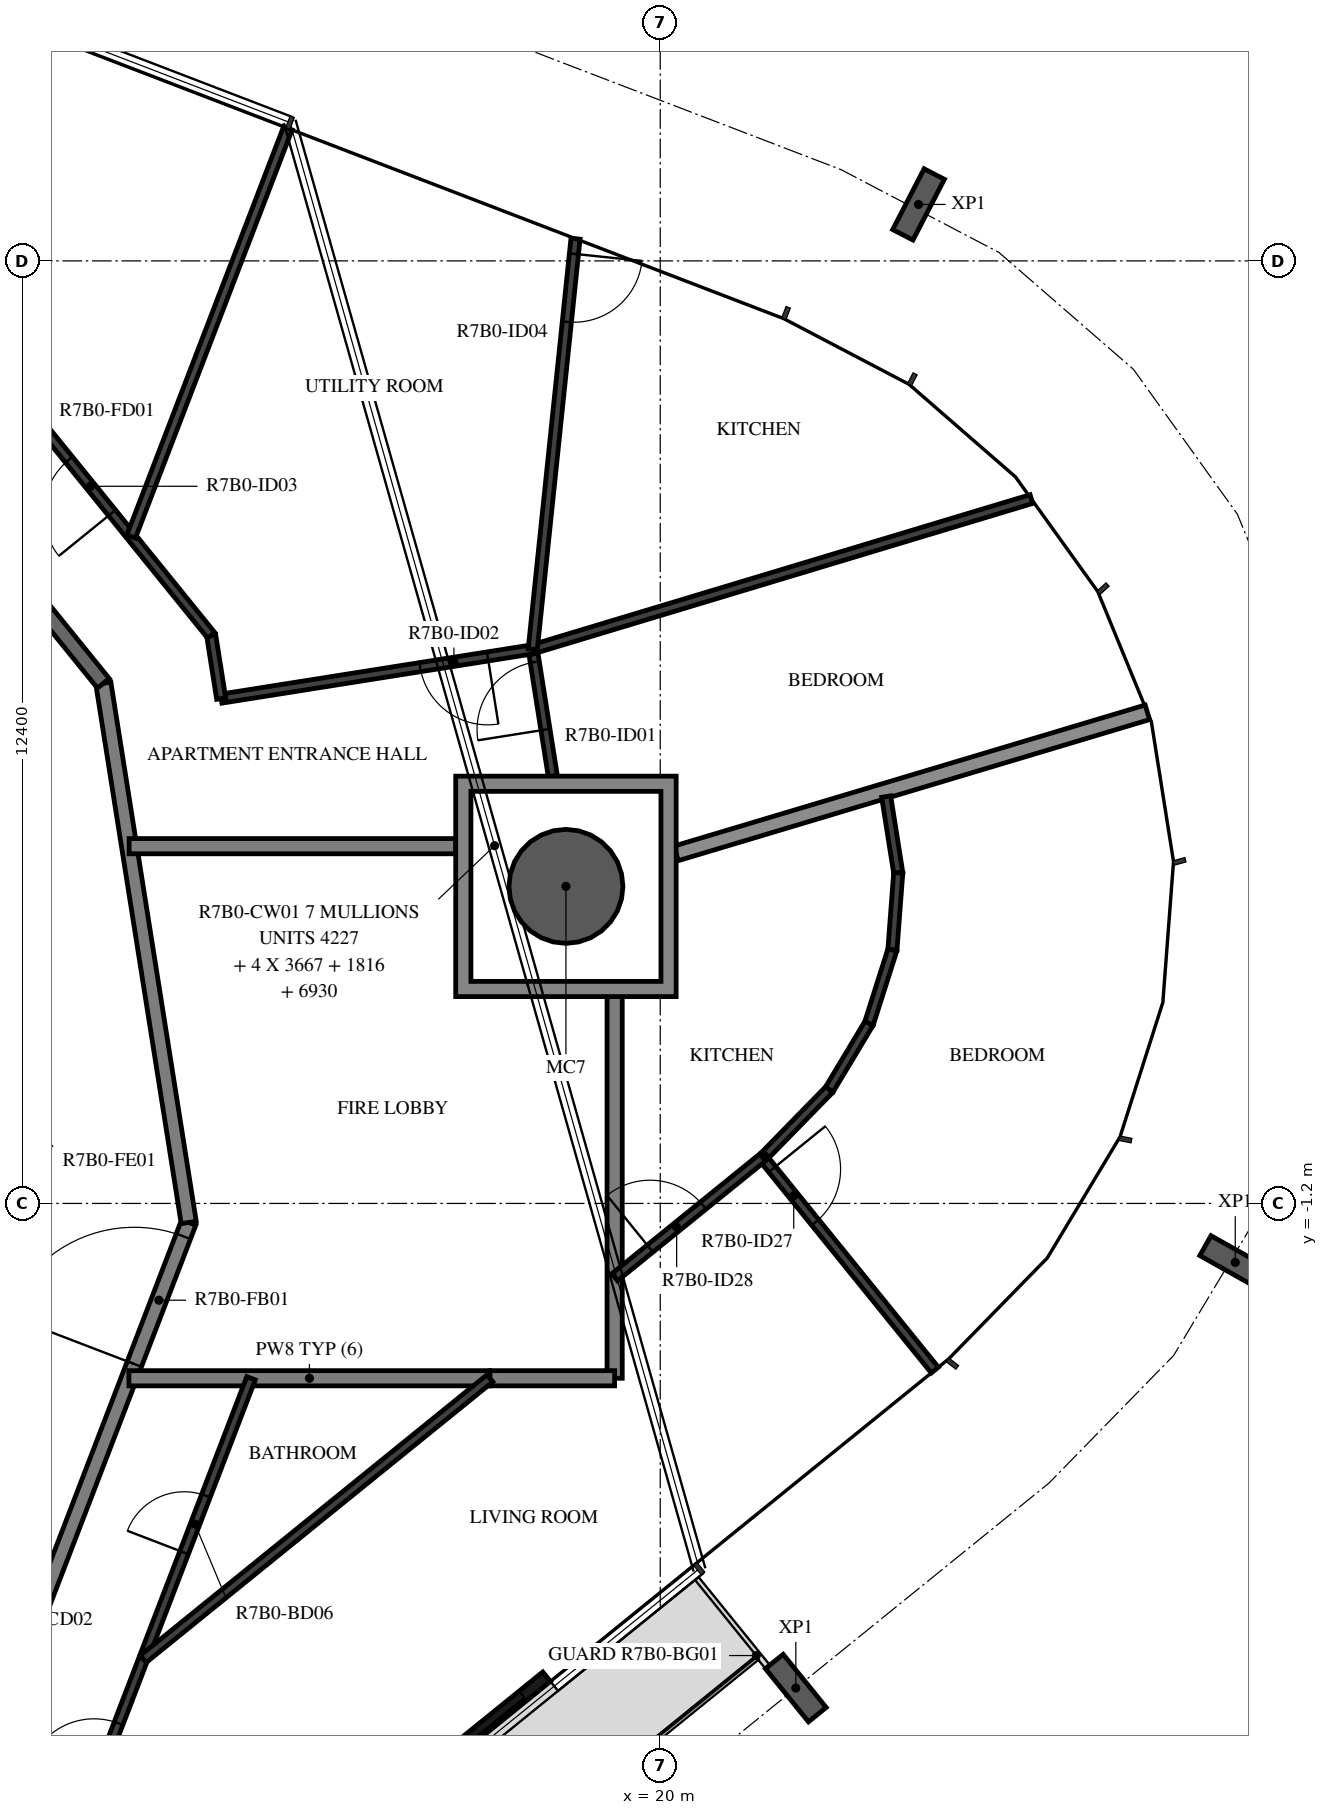
"""IFC4 building model, lengths in metres.
Left out: names, types, materials, properties, quantities, classifications, styles, units other than length and angle.
Written with IfcOpenShell. Run it as: python <this file> out.ifc"""

import sys

from ifc_helpers import new_model, si_unit, direction, frame, frame_2d, origin, origin_2d, place, context, subcontext, project, spatial, polyline, rectangle, hollow_circle, i_section, outline, extrude, element, fill, save


model = new_model("IFC4")
c1 = context("Model", 3, precision=1e-05, world=origin(), true_north=direction((0.0, 1.0)))
c2 = subcontext(c1, "Body", "Model", "MODEL_VIEW")
j1 = project(units=[si_unit("LENGTHUNIT", "METRE"), si_unit("PLANEANGLEUNIT", "RADIAN")], contexts=[c1])
p1 = place(None, origin())
s1 = spatial("IfcSite", under=j1, at=p1, CompositionType="ELEMENT")
p2 = place(p1, origin())
s2 = spatial("IfcBuilding", under=s1, at=p2, CompositionType="ELEMENT")
p3 = place(p2, frame((0.0, 0.0, 277.4)))
s3 = spatial("IfcBuildingStorey", under=s2, at=p3, CompositionType="ELEMENT", Elevation=277.4)
p4 = place(p3, frame((18.76, 2.971, -0.38), z_axis=(0.0, 0.0, 1.0), x_axis=(1.0, 0.0, 0.0)))
e1 = element("IfcColumn", 1, at=p4, inside=s3, PredefinedType="COLUMN", context=c2, shape_type="SweptSolid", body=[
    extrude(hollow_circle(Radius=0.75, WallThickness=0.035, at=origin_2d()), origin(), (0.0, 0.0, 1.0), 3.5),
])
for number, where, z_axis, x_axis in (
    (2, (21.784, -7.576, -0.38), (0.0, 0.0, 1.0), (-0.777, -0.629, 0.0)),
    (3, (27.565, -1.976, -0.38), (0.0, 0.0, 1.0), (-0.49, -0.872, 0.0)),
    (4, (23.398, 11.943, -0.38), (0.0, 0.0, 1.0), (0.888, -0.459, 0.0)),
):
    element("IfcColumn", number, at=place(p3, frame(where, z_axis=z_axis, x_axis=x_axis)), inside=s3, PredefinedType="COLUMN", context=c2, shape_type="SweptSolid", body=[
        extrude(i_section(OverallWidth=0.3, OverallDepth=0.9, WebThickness=0.019, FlangeThickness=0.035, FilletRadius=0.03, at=origin_2d()), origin(), (0.0, 0.0, 1.0), 3.5),
    ])
p5 = place(p3, frame((16.018, -9.44, 0.0), z_axis=(0.0, 0.0, 1.0), x_axis=(0.777125818, 0.629345265333, 0.0)))
e5 = element("IfcWall", 5, at=p5, inside=s3, PredefinedType="STANDARD", context=c2, shape_type="SweptSolid", body=[
    extrude(rectangle(XDim=3.2, YDim=0.16, at=frame_2d((1.6, 0.0))), origin(), (0.0, 0.0, 1.0), 3.12),
])
p6 = place(p5, frame((0.4, 0.0, 0.0)))
e6 = element("IfcOpeningElement", 6, at=p6, cuts=e5, PredefinedType="OPENING", context=c2, shape_type="SweptSolid", body=[
    extrude(rectangle(XDim=2.4, YDim=2.4, at=frame_2d((1.2, 1.2))), frame((0.0, 0.09, 0.0), z_axis=(0.0, -1.0, 0.0), x_axis=(1.0, 0.0, 0.0)), (0.0, 0.0, 1.0), 0.18),
])
p7 = place(p3, frame((11.223, -8.154, 0.0), z_axis=(0.0, 0.0, 1.0), x_axis=(0.358341090983, 0.93359073609, 0.0)))
e7 = element("IfcWall", 7, at=p7, inside=s3, PredefinedType="STANDARD", context=c2, shape_type="SweptSolid", body=[
    extrude(rectangle(XDim=7.181, YDim=0.2, at=frame_2d((3.59, 0.0))), origin(), (0.0, 0.0, 1.0), 3.12),
])
p8 = place(p7, frame((5.185, 0.0, 0.0)))
e8 = element("IfcOpeningElement", 8, at=p8, cuts=e7, PredefinedType="OPENING", context=c2, shape_type="SweptSolid", body=[
    extrude(rectangle(XDim=1.8, YDim=2.1, at=frame_2d((0.9, 1.05))), frame((0.0, 0.11, 0.0), z_axis=(0.0, -1.0, 0.0), x_axis=(1.0, 0.0, 0.0)), (0.0, 0.0, 1.0), 0.22),
])
p9 = place(p3, frame((13.797, -1.45, 0.0), z_axis=(0.0, 0.0, 1.0), x_axis=(-0.156421704315, 0.987690361611, 0.0)))
e9 = element("IfcWall", 9, at=p9, inside=s3, PredefinedType="STANDARD", context=c2, shape_type="SweptSolid", body=[
    extrude(rectangle(XDim=7.181, YDim=0.2, at=frame_2d((3.591, 0.0))), origin(), (0.0, 0.0, 1.0), 3.12),
])
p10 = place(p3, frame((12.673, 5.643, 0.0), z_axis=(0.0, 0.0, 1.0), x_axis=(-0.629302871585, 0.777160148113, 0.0)))
e10 = element("IfcWall", 10, at=p10, inside=s3, PredefinedType="STANDARD", context=c2, shape_type="SweptSolid", body=[
    extrude(rectangle(XDim=7.181, YDim=0.2, at=frame_2d((3.59, 0.0))), origin(), (0.0, 0.0, 1.0), 3.12),
])
p11 = place(p10, frame((4.1, 0.0, 0.0)))
e11 = element("IfcOpeningElement", 11, at=p11, cuts=e10, PredefinedType="OPENING", context=c2, shape_type="SweptSolid", body=[
    extrude(rectangle(XDim=1.0, YDim=2.1, at=frame_2d((0.5, 1.05))), frame((0.0, 0.11, 0.0), z_axis=(0.0, -1.0, 0.0), x_axis=(1.0, 0.0, 0.0)), (0.0, 0.0, 1.0), 0.22),
])
p12 = place(p3, frame((17.309, 3.5, 0.0), z_axis=(0.0, 0.0, 1.0), x_axis=(-1.0, 0.0, 0.0)))
e12 = element("IfcWall", 12, at=p12, inside=s3, PredefinedType="STANDARD", context=c2, shape_type="SweptSolid", body=[
    extrude(rectangle(XDim=4.297, YDim=0.2, at=frame_2d((2.148, 0.0))), origin(), (0.0, 0.0, 1.0), 3.12),
])
p13 = place(p3, frame((13.01, -3.5, 0.0), z_axis=(0.0, 0.0, 1.0), x_axis=(1.0, 0.0, 0.0)))
e13 = element("IfcWall", 13, at=p13, inside=s3, PredefinedType="STANDARD", context=c2, shape_type="SweptSolid", body=[
    extrude(rectangle(XDim=4.75, YDim=0.2, at=frame_2d((2.375, 0.0))), origin(), (0.0, 0.0, 1.0), 3.12),
])
p14 = place(p3, frame((19.4, -3.5, 0.0), z_axis=(0.0, 0.0, 1.0), x_axis=(0.0, 1.0, 0.0)))
e14 = element("IfcWall", 14, at=p14, inside=s3, PredefinedType="STANDARD", context=c2, shape_type="SweptSolid", body=[
    extrude(rectangle(XDim=5.021, YDim=0.2, at=frame_2d((2.511, 0.0))), origin(), (0.0, 0.0, 1.0), 3.12),
])
p15 = place(p3, frame((17.76, -3.5, 0.0), z_axis=(0.0, 0.0, 1.0), x_axis=(1.0, 0.0, 0.0)))
e15 = element("IfcWall", 15, at=p15, inside=s3, PredefinedType="STANDARD", context=c2, shape_type="SweptSolid", body=[
    extrude(rectangle(XDim=1.64, YDim=0.2, at=frame_2d((0.82, 0.0))), origin(), (0.0, 0.0, 1.0), 3.12),
])
p16 = place(p3, frame((20.209, 3.405, 0.0), z_axis=(0.0, 0.0, 1.0), x_axis=(0.957991224208, 0.286797514529, 0.0)))
e16 = element("IfcWall", 16, at=p16, inside=s3, PredefinedType="STANDARD", context=c2, shape_type="SweptSolid", body=[
    extrude(rectangle(XDim=6.471, YDim=0.2, at=frame_2d((3.236, 0.0))), origin(), (0.0, 0.0, 1.0), 2.73),
])
p17 = place(p3, frame((18.587, 4.421, 0.0), z_axis=(0.0, 0.0, 1.0), x_axis=(-0.156474488977, 0.987682000595, 0.0)))
e17 = element("IfcWall", 17, at=p17, inside=s3, PredefinedType="PARTITIONING", context=c2, shape_type="SweptSolid", body=[
    extrude(rectangle(XDim=1.69, YDim=0.12, at=frame_2d((0.845, 0.0))), origin(), (0.0, 0.0, 1.0), 3.12),
])
p18 = place(p17, frame((0.62, 0.0, 0.0)))
e18 = element("IfcOpeningElement", 18, at=p18, cuts=e17, PredefinedType="OPENING", context=c2, shape_type="SweptSolid", body=[
    extrude(rectangle(XDim=0.9, YDim=2.1, at=frame_2d((0.45, 1.05))), frame((0.0, 0.07, 0.0), z_axis=(0.0, -1.0, 0.0), x_axis=(1.0, 0.0, 0.0)), (0.0, 0.0, 1.0), 0.14),
])
p19 = place(p3, frame((18.323, 6.09, 0.0), z_axis=(0.0, 0.0, 1.0), x_axis=(-0.987686518745, -0.156445967317, 0.0)))
e19 = element("IfcWall", 19, at=p19, inside=s3, PredefinedType="PARTITIONING", context=c2, shape_type="SweptSolid", body=[
    extrude(rectangle(XDim=4.149, YDim=0.12, at=frame_2d((2.075, 0.0))), origin(), (0.0, 0.0, 1.0), 3.12),
])
p20 = place(p19, frame((0.6, 0.0, 0.0)))
e20 = element("IfcOpeningElement", 20, at=p20, cuts=e19, PredefinedType="OPENING", context=c2, shape_type="SweptSolid", body=[
    extrude(rectangle(XDim=0.9, YDim=2.1, at=frame_2d((0.45, 1.05))), frame((0.0, 0.07, 0.0), z_axis=(0.0, -1.0, 0.0), x_axis=(1.0, 0.0, 0.0)), (0.0, 0.0, 1.0), 0.14),
])
p21 = place(p3, frame((14.224, 5.441, 0.0), z_axis=(0.0, 0.0, 1.0), x_axis=(-0.156556956418, 0.987668932081, 0.0)))
e21 = element("IfcWall", 21, at=p21, inside=s3, PredefinedType="PARTITIONING", context=c2, shape_type="SweptSolid", body=[
    extrude(rectangle(XDim=0.844, YDim=0.12, at=frame_2d((0.422, 0.0))), origin(), (0.0, 0.0, 1.0), 3.12),
])
p22 = place(p3, frame((14.092, 6.274, 0.0), z_axis=(0.0, 0.0, 1.0), x_axis=(-0.62933367237, 0.777135206268, 0.0)))
e22 = element("IfcWall", 22, at=p22, inside=s3, PredefinedType="PARTITIONING", context=c2, shape_type="SweptSolid", body=[
    extrude(rectangle(XDim=7.985, YDim=0.12, at=frame_2d((3.992, 0.0))), origin(), (0.0, 0.0, 1.0), 3.12),
])
p23 = place(p22, frame((2.073, 0.0, 0.0)))
e23 = element("IfcOpeningElement", 23, at=p23, cuts=e22, PredefinedType="OPENING", context=c2, shape_type="SweptSolid", body=[
    extrude(rectangle(XDim=0.9, YDim=2.1, at=frame_2d((0.45, 1.05))), frame((0.0, 0.07, 0.0), z_axis=(0.0, -1.0, 0.0), x_axis=(1.0, 0.0, 0.0)), (0.0, 0.0, 1.0), 0.14),
])
p24 = place(p3, frame((24.883, 8.067, 0.0), z_axis=(0.0, 0.0, 1.0), x_axis=(-0.957485305222, -0.288482044995, 0.0)))
e24 = element("IfcWall", 24, at=p24, inside=s3, PredefinedType="PARTITIONING", context=c2, shape_type="SweptSolid", body=[
    extrude(rectangle(XDim=6.852, YDim=0.12, at=frame_2d((3.426, 0.0))), origin(), (0.0, 0.0, 1.0), 3.12),
])
p25 = place(p3, frame((18.885, 11.492, 0.0), z_axis=(0.0, 0.0, 1.0), x_axis=(-0.10365981832, -0.994612810126, 0.0)))
e25 = element("IfcWall", 25, at=p25, inside=s3, PredefinedType="PARTITIONING", context=c2, shape_type="SweptSolid", body=[
    extrude(rectangle(XDim=5.431, YDim=0.12, at=frame_2d((2.716, 0.0))), origin(), (0.0, 0.0, 1.0), 3.12),
])
p26 = place(p25, frame((0.2, 0.0, 0.0)))
e26 = element("IfcOpeningElement", 26, at=p26, cuts=e25, PredefinedType="OPENING", context=c2, shape_type="SweptSolid", body=[
    extrude(rectangle(XDim=0.9, YDim=2.1, at=frame_2d((0.45, 1.05))), frame((0.0, 0.07, 0.0), z_axis=(0.0, -1.0, 0.0), x_axis=(1.0, 0.0, 0.0)), (0.0, 0.0, 1.0), 0.14),
])
p27 = place(p3, frame((15.101, 12.945, 0.0), z_axis=(0.0, 0.0, 1.0), x_axis=(-0.358373232579, -0.933578398513, 0.0)))
e27 = element("IfcWall", 27, at=p27, inside=s3, PredefinedType="PARTITIONING", context=c2, shape_type="SweptSolid", body=[
    extrude(rectangle(XDim=5.752, YDim=0.12, at=frame_2d((2.876, 0.0))), origin(), (0.0, 0.0, 1.0), 2.73),
])
p28 = place(p3, frame((12.479, -9.067, 0.0), z_axis=(0.0, 0.0, 1.0), x_axis=(0.358372669661, 0.933578614601, 0.0)))
e28 = element("IfcWall", 28, at=p28, inside=s3, PredefinedType="PARTITIONING", context=c2, shape_type="SweptSolid", body=[
    extrude(rectangle(XDim=5.963, YDim=0.12, at=frame_2d((2.981, 0.0))), origin(), (0.0, 0.0, 1.0), 3.12),
])
p29 = place(p28, frame((0.2, 0.0, 0.0)))
e29 = element("IfcOpeningElement", 29, at=p29, cuts=e28, PredefinedType="OPENING", context=c2, shape_type="SweptSolid", body=[
    extrude(rectangle(XDim=0.9, YDim=2.1, at=frame_2d((0.45, 1.05))), frame((0.0, 0.07, 0.0), z_axis=(0.0, -1.0, 0.0), x_axis=(1.0, 0.0, 0.0)), (0.0, 0.0, 1.0), 0.14),
])
p30 = place(p28, frame((3.507, 0.0, 0.0)))
e30 = element("IfcOpeningElement", 30, at=p30, cuts=e28, PredefinedType="OPENING", context=c2, shape_type="SweptSolid", body=[
    extrude(rectangle(XDim=0.8, YDim=2.1, at=frame_2d((0.4, 1.05))), frame((0.0, 0.07, 0.0), z_axis=(0.0, -1.0, 0.0), x_axis=(1.0, 0.0, 0.0)), (0.0, 0.0, 1.0), 0.14),
])
p31 = place(p3, frame((22.972, 4.153, 0.0), z_axis=(0.0, 0.0, 1.0), x_axis=(0.156209385929, -0.987723963336, 0.0)))
e31 = element("IfcWall", 31, at=p31, inside=s3, PredefinedType="PARTITIONING", context=c2, shape_type="SweptSolid", body=[
    extrude(rectangle(XDim=1.016, YDim=0.12, at=frame_2d((0.508, 0.0))), origin(), (0.0, 0.0, 1.0), 3.12),
])
p32 = place(p3, frame((23.131, 3.149, 0.0), z_axis=(0.0, 0.0, 1.0), x_axis=(-0.075446997935, -0.99714981347, 0.0)))
e32 = element("IfcWall", 32, at=p32, inside=s3, PredefinedType="PARTITIONING", context=c2, shape_type="SweptSolid", body=[
    extrude(rectangle(XDim=1.016, YDim=0.12, at=frame_2d((0.508, 0.0))), origin(), (0.0, 0.0, 1.0), 3.12),
])
p33 = place(p3, frame((23.054, 2.136, 0.0), z_axis=(0.0, 0.0, 1.0), x_axis=(-0.303511129679, -0.952827893253, 0.0)))
e33 = element("IfcWall", 33, at=p33, inside=s3, PredefinedType="PARTITIONING", context=c2, shape_type="SweptSolid", body=[
    extrude(rectangle(XDim=1.016, YDim=0.12, at=frame_2d((0.508, 0.0))), origin(), (0.0, 0.0, 1.0), 3.12),
])
p34 = place(p3, frame((22.746, 1.168, 0.0), z_axis=(0.0, 0.0, 1.0), x_axis=(-0.515096534995, -0.857132171626, 0.0)))
e34 = element("IfcWall", 34, at=p34, inside=s3, PredefinedType="PARTITIONING", context=c2, shape_type="SweptSolid", body=[
    extrude(rectangle(XDim=1.016, YDim=0.12, at=frame_2d((0.508, 0.0))), origin(), (0.0, 0.0, 1.0), 3.12),
])
p35 = place(p3, frame((22.223, 0.298, 0.0), z_axis=(0.0, 0.0, 1.0), x_axis=(-0.69880109182, -0.715316037896, 0.0)))
e35 = element("IfcWall", 35, at=p35, inside=s3, PredefinedType="PARTITIONING", context=c2, shape_type="SweptSolid", body=[
    extrude(rectangle(XDim=1.227, YDim=0.12, at=frame_2d((0.614, 0.0))), origin(), (0.0, 0.0, 1.0), 3.12),
])
p36 = place(p3, frame((21.347, -0.595, 0.0), z_axis=(0.0, 0.0, 1.0), x_axis=(0.62934843781, -0.7771232488, 0.0)))
e36 = element("IfcWall", 36, at=p36, inside=s3, PredefinedType="PARTITIONING", context=c2, shape_type="SweptSolid", body=[
    extrude(rectangle(XDim=3.6, YDim=0.12, at=frame_2d((1.8, 0.0))), origin(), (0.0, 0.0, 1.0), 3.12),
])
p37 = place(p36, frame((0.2, 0.0, 0.0)))
e37 = element("IfcOpeningElement", 37, at=p37, cuts=e36, PredefinedType="OPENING", context=c2, shape_type="SweptSolid", body=[
    extrude(rectangle(XDim=0.9, YDim=2.1, at=frame_2d((0.45, 1.05))), frame((0.0, 0.07, 0.0), z_axis=(0.0, -1.0, 0.0), x_axis=(1.0, 0.0, 0.0)), (0.0, 0.0, 1.0), 0.14),
])
p38 = place(p3, frame((19.4, -2.172, 0.0), z_axis=(0.0, 0.0, 1.0), x_axis=(0.777147279935, 0.629318762862, 0.0)))
e38 = element("IfcWall", 38, at=p38, inside=s3, PredefinedType="PARTITIONING", context=c2, shape_type="SweptSolid", body=[
    extrude(rectangle(XDim=2.505, YDim=0.12, at=frame_2d((1.253, 0.0))), origin(), (0.0, 0.0, 1.0), 3.12),
])
p39 = place(p38, frame((0.6, 0.0, 0.0)))
e39 = element("IfcOpeningElement", 39, at=p39, cuts=e38, PredefinedType="OPENING", context=c2, shape_type="SweptSolid", body=[
    extrude(rectangle(XDim=0.9, YDim=2.1, at=frame_2d((0.45, 1.05))), frame((0.0, 0.07, 0.0), z_axis=(0.0, -1.0, 0.0), x_axis=(1.0, 0.0, 0.0)), (0.0, 0.0, 1.0), 0.14),
])
p40 = place(p3, frame((17.76, -3.5, 0.0), z_axis=(0.0, 0.0, 1.0), x_axis=(-0.777133455716, -0.62933583404, 0.0)))
e40 = element("IfcWall", 40, at=p40, inside=s3, PredefinedType="PARTITIONING", context=c2, shape_type="SweptSolid", body=[
    extrude(rectangle(XDim=5.869, YDim=0.12, at=frame_2d((2.935, 0.0))), origin(), (0.0, 0.0, 1.0), 3.12),
])
p41 = place(p3, origin())
e41 = element("IfcWall", 41, at=p41, inside=s3, PredefinedType="STANDARD", context=c2, shape_type="SweptSolid", body=[
    extrude(outline(polyline([(20.209, 4.421), (20.209, 1.521), (17.309, 1.521), (17.309, 4.421), (20.209, 4.421)]), holes=[polyline([(17.51, 1.721), (20.01, 1.721), (20.01, 4.221), (17.51, 4.221), (17.51, 1.721)])]), origin(), (0.0, 0.0, 1.0), 3.12),
])
p42 = place(p6, origin())
e42 = element("IfcDoor", 42, at=p42, inside=s3, OperationType="DOUBLE_DOOR_SLIDING", PredefinedType="DOOR", context=c2, shape_type="SweptSolid", body=[
    extrude(rectangle(XDim=2.4, YDim=2.4, at=frame_2d((1.2, 1.2))), frame((0.0, 0.025, 0.0), z_axis=(0.0, -1.0, 0.0), x_axis=(1.0, 0.0, 0.0)), (0.0, 0.0, 1.0), 0.05),
])
fill(e6, e42)
p43 = place(p18, origin())
e43 = element("IfcDoor", 43, at=p43, inside=s3, OperationType="SINGLE_SWING_LEFT", PredefinedType="DOOR", context=c2, shape_type="SweptSolid", body=[
    extrude(rectangle(XDim=0.9, YDim=2.1, at=frame_2d((0.45, 1.05))), frame((0.0, 0.025, 0.0), z_axis=(0.0, -1.0, 0.0), x_axis=(1.0, 0.0, 0.0)), (0.0, 0.0, 1.0), 0.05),
])
fill(e18, e43)
p44 = place(p20, origin())
e44 = element("IfcDoor", 44, at=p44, inside=s3, OperationType="SINGLE_SWING_RIGHT", PredefinedType="DOOR", context=c2, shape_type="SweptSolid", body=[
    extrude(rectangle(XDim=0.9, YDim=2.1, at=frame_2d((0.45, 1.05))), frame((0.0, 0.025, 0.0), z_axis=(0.0, -1.0, 0.0), x_axis=(1.0, 0.0, 0.0)), (0.0, 0.0, 1.0), 0.05),
])
fill(e20, e44)
p45 = place(p23, origin())
e45 = element("IfcDoor", 45, at=p45, inside=s3, OperationType="SINGLE_SWING_LEFT", PredefinedType="DOOR", context=c2, shape_type="SweptSolid", body=[
    extrude(rectangle(XDim=0.9, YDim=2.1, at=frame_2d((0.45, 1.05))), frame((0.0, 0.025, 0.0), z_axis=(0.0, -1.0, 0.0), x_axis=(1.0, 0.0, 0.0)), (0.0, 0.0, 1.0), 0.05),
])
fill(e23, e45)
p46 = place(p26, origin())
e46 = element("IfcDoor", 46, at=p46, inside=s3, OperationType="SINGLE_SWING_LEFT", PredefinedType="DOOR", context=c2, shape_type="SweptSolid", body=[
    extrude(rectangle(XDim=0.9, YDim=2.1, at=frame_2d((0.45, 1.05))), frame((0.0, 0.025, 0.0), z_axis=(0.0, -1.0, 0.0), x_axis=(1.0, 0.0, 0.0)), (0.0, 0.0, 1.0), 0.05),
])
fill(e26, e46)
p47 = place(p29, origin())
e47 = element("IfcDoor", 47, at=p47, inside=s3, OperationType="SINGLE_SWING_RIGHT", PredefinedType="DOOR", context=c2, shape_type="SweptSolid", body=[
    extrude(rectangle(XDim=0.9, YDim=2.1, at=frame_2d((0.45, 1.05))), frame((0.0, 0.025, 0.0), z_axis=(0.0, -1.0, 0.0), x_axis=(1.0, 0.0, 0.0)), (0.0, 0.0, 1.0), 0.05),
])
fill(e29, e47)
p48 = place(p30, origin())
e48 = element("IfcDoor", 48, at=p48, inside=s3, OperationType="SINGLE_SWING_RIGHT", PredefinedType="DOOR", context=c2, shape_type="SweptSolid", body=[
    extrude(rectangle(XDim=0.8, YDim=2.1, at=frame_2d((0.4, 1.05))), frame((0.0, 0.025, 0.0), z_axis=(0.0, -1.0, 0.0), x_axis=(1.0, 0.0, 0.0)), (0.0, 0.0, 1.0), 0.05),
])
fill(e30, e48)
p49 = place(p37, origin())
e49 = element("IfcDoor", 49, at=p49, inside=s3, OperationType="SINGLE_SWING_RIGHT", PredefinedType="DOOR", context=c2, shape_type="SweptSolid", body=[
    extrude(rectangle(XDim=0.9, YDim=2.1, at=frame_2d((0.45, 1.05))), frame((0.0, 0.025, 0.0), z_axis=(0.0, -1.0, 0.0), x_axis=(1.0, 0.0, 0.0)), (0.0, 0.0, 1.0), 0.05),
])
fill(e37, e49)
p50 = place(p39, origin())
e50 = element("IfcDoor", 50, at=p50, inside=s3, OperationType="SINGLE_SWING_LEFT", PredefinedType="DOOR", context=c2, shape_type="SweptSolid", body=[
    extrude(rectangle(XDim=0.9, YDim=2.1, at=frame_2d((0.45, 1.05))), frame((0.0, 0.025, 0.0), z_axis=(0.0, -1.0, 0.0), x_axis=(1.0, 0.0, 0.0)), (0.0, 0.0, 1.0), 0.05),
])
fill(e39, e50)
p51 = place(p8, origin())
e51 = element("IfcDoor", 51, at=p51, inside=s3, OperationType="DOUBLE_DOOR_SINGLE_SWING", PredefinedType="DOOR", context=c2, shape_type="SweptSolid", body=[
    extrude(rectangle(XDim=1.8, YDim=2.1, at=frame_2d((0.9, 1.05))), frame((0.0, 0.025, 0.0), z_axis=(0.0, -1.0, 0.0), x_axis=(1.0, 0.0, 0.0)), (0.0, 0.0, 1.0), 0.05),
])
fill(e8, e51)
save(model, sys.argv[1])
